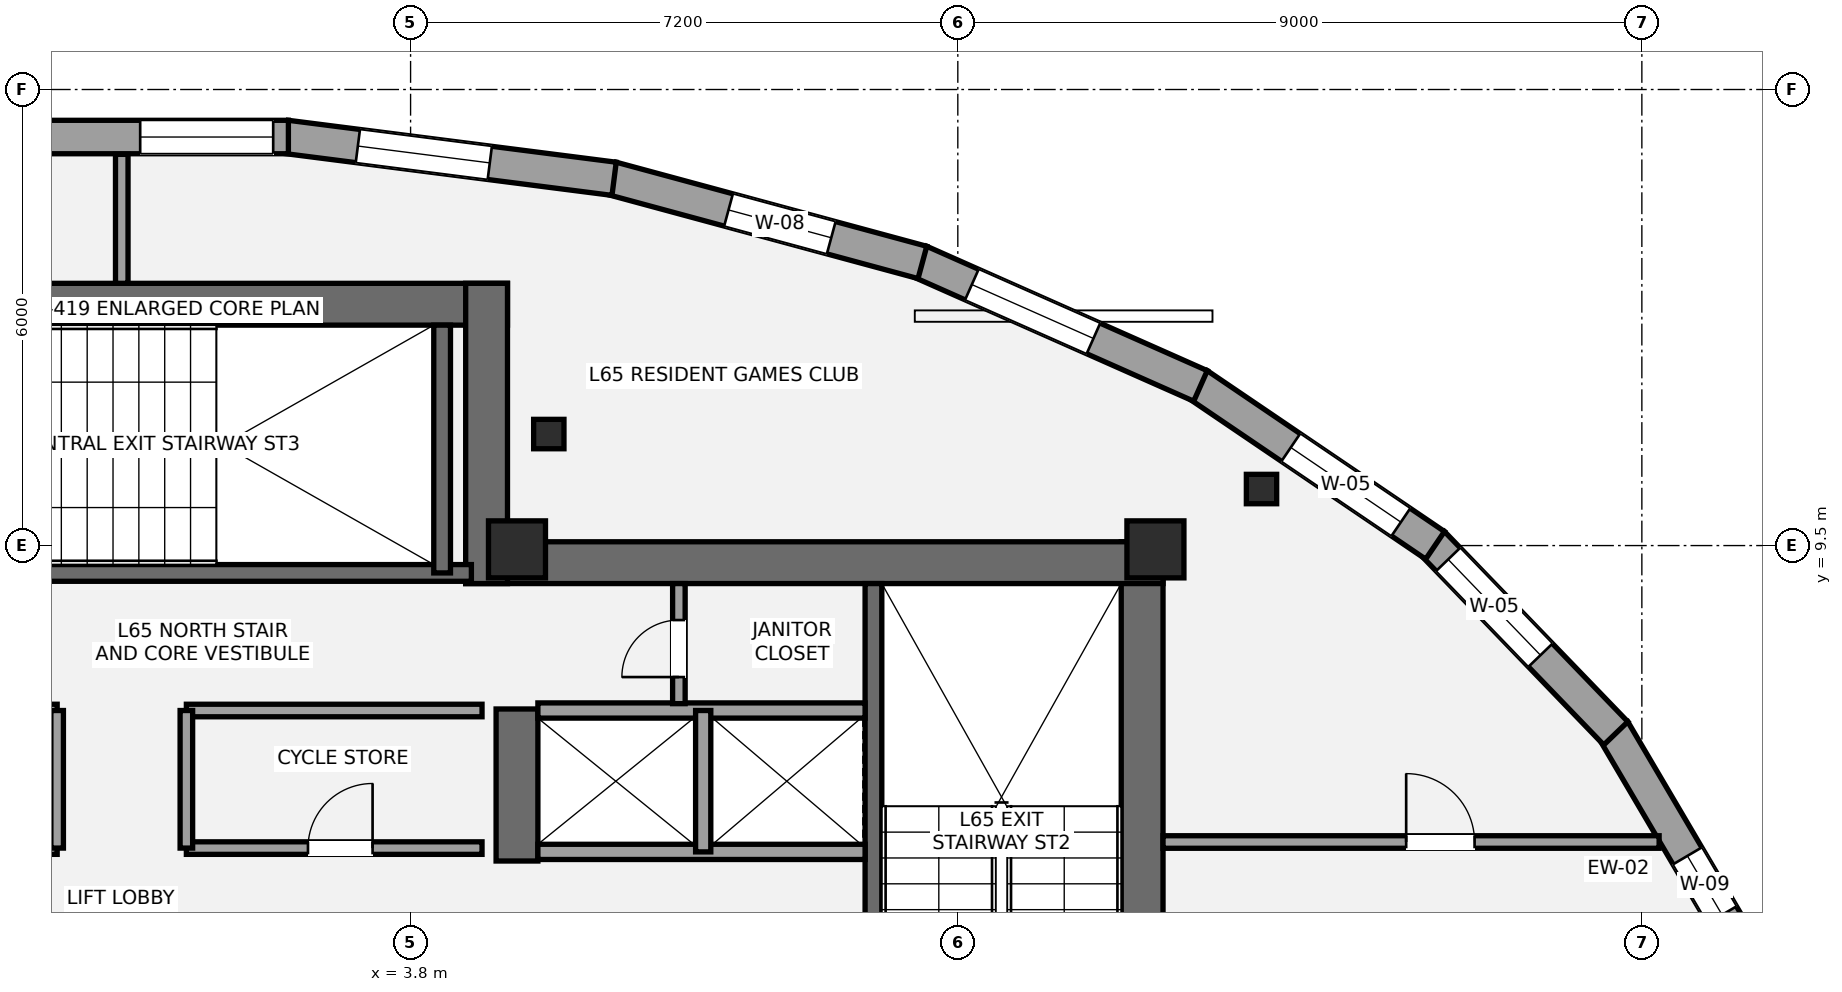
"""IFC4 building model, lengths in metres.
Left out: names, types, materials, properties, quantities, classifications, styles, units other than length and angle.
Written with IfcOpenShell. Run it as: python <this file> out.ifc"""

import sys

from ifc_helpers import new_model, si_unit, direction, frame, frame_2d, origin, origin_2d, place, context, subcontext, project, spatial, rectangle, i_section, extrude, element, fill, save


model = new_model("IFC4")
c1 = context("Model", 3, precision=1e-05, world=origin(), true_north=direction((0.0, 1.0)))
c2 = subcontext(c1, "Body", "Model", "MODEL_VIEW")
j1 = project(units=[si_unit("LENGTHUNIT", "METRE"), si_unit("PLANEANGLEUNIT", "RADIAN")], contexts=[c1])
p1 = place(None, origin())
s1 = spatial("IfcSite", under=j1, at=p1, CompositionType="ELEMENT")
p2 = place(p1, origin())
s2 = spatial("IfcBuilding", under=s1, at=p2, CompositionType="ELEMENT")
p3 = place(p2, frame((0.0, 0.0, 232.05)))
s3 = spatial("IfcBuildingStorey", under=s2, at=p3, CompositionType="ELEMENT", Elevation=232.05)
p4 = place(p3, frame((13.425, 1.3, 0.0), z_axis=(0.0, 0.0, 1.0), x_axis=(0.0, 1.0, 0.0)))
e1 = element("IfcWall", 1, at=p4, inside=s3, PredefinedType="SHEAR", context=c2, shape_type="SweptSolid", body=[
    extrude(rectangle(XDim=8.25, YDim=0.55, at=frame_2d((4.125, 0.0))), origin(), (0.0, 0.0, 1.0), 3.15),
])
p5 = place(p3, frame((4.525, 9.275, 0.0), z_axis=(0.0, 0.0, 1.0), x_axis=(1.0, 0.0, 0.0)))
e2 = element("IfcWall", 2, at=p5, inside=s3, PredefinedType="SHEAR", context=c2, shape_type="SweptSolid", body=[
    extrude(rectangle(XDim=9.175, YDim=0.55, at=frame_2d((4.587, 0.0))), origin(), (0.0, 0.0, 1.0), 3.15),
])
p6 = place(p3, frame((5.2, 5.35, 0.0), z_axis=(0.0, 0.0, 1.0), x_axis=(0.0, 1.0, 0.0)))
e3 = element("IfcWall", 3, at=p6, inside=s3, PredefinedType="SHEAR", context=c2, shape_type="SweptSolid", body=[
    extrude(rectangle(XDim=2.0, YDim=0.55, at=frame_2d((1.0, 0.0))), origin(), (0.0, 0.0, 1.0), 3.15),
])
p7 = place(p3, frame((9.89, 1.85, 0.0), z_axis=(0.0, 0.0, 1.0), x_axis=(0.0, 1.0, 0.0)))
e4 = element("IfcWall", 4, at=p7, inside=s3, PredefinedType="SHEAR", context=c2, shape_type="SweptSolid", body=[
    extrude(rectangle(XDim=7.15, YDim=0.22, at=frame_2d((3.575, 0.0))), origin(), (0.0, 0.0, 1.0), 3.15),
])
p8 = place(p3, frame((-5.075, 12.675, 0.0), z_axis=(0.0, 0.0, 1.0), x_axis=(1.0, 0.0, 0.0)))
e5 = element("IfcWall", 5, at=p8, inside=s3, PredefinedType="SHEAR", context=c2, shape_type="SweptSolid", body=[
    extrude(rectangle(XDim=10.15, YDim=0.55, at=frame_2d((5.075, 0.0))), origin(), (0.0, 0.0, 1.0), 3.15),
])
p9 = place(p3, frame((4.8, 9.0, 0.0), z_axis=(0.0, 0.0, 1.0), x_axis=(0.0, 1.0, 0.0)))
e6 = element("IfcWall", 6, at=p9, inside=s3, PredefinedType="SHEAR", context=c2, shape_type="SweptSolid", body=[
    extrude(rectangle(XDim=3.95, YDim=0.55, at=frame_2d((1.975, 0.0))), origin(), (0.0, 0.0, 1.0), 3.15),
])
p10 = place(p3, frame((-4.7, 9.14, 0.0), z_axis=(0.0, 0.0, 1.0), x_axis=(1.0, 0.0, 0.0)))
e7 = element("IfcWall", 7, at=p10, inside=s3, PredefinedType="SHEAR", context=c2, shape_type="SweptSolid", body=[
    extrude(rectangle(XDim=9.3, YDim=0.22, at=frame_2d((4.65, 0.0))), origin(), (0.0, 0.0, 1.0), 3.15),
])
p11 = place(p10, frame((1.15, 0.0, 0.0)))
e8 = element("IfcOpeningElement", 8, at=p11, cuts=e7, PredefinedType="OPENING", context=c2, shape_type="SweptSolid", body=[
    extrude(rectangle(XDim=1.05, YDim=2.15, at=frame_2d((0.525, 1.075))), frame((0.0, 0.12, 0.0), z_axis=(0.0, -1.0, 0.0), x_axis=(1.0, 0.0, 0.0)), (0.0, 0.0, 1.0), 0.24),
])
p12 = place(p3, frame((4.215, 9.14, 0.0), z_axis=(0.0, 0.0, 1.0), x_axis=(0.0, 1.0, 0.0)))
e9 = element("IfcWall", 9, at=p12, inside=s3, PredefinedType="SHEAR", context=c2, shape_type="SweptSolid", body=[
    extrude(rectangle(XDim=3.26, YDim=0.22, at=frame_2d((1.63, 0.0))), origin(), (0.0, 0.0, 1.0), 3.15),
])
for number, where, z_axis, x_axis in (
    (10, (5.2, 9.45, 0.0), (0.0, 0.0, 1.0), (1.0, 0.0, 0.0)),
    (11, (13.6, 9.45, 0.0), (0.0, 0.0, 1.0), (1.0, 0.0, 0.0)),
):
    element("IfcColumn", number, at=place(p3, frame(where, z_axis=z_axis, x_axis=x_axis)), inside=s3, PredefinedType="PILASTER", context=c2, shape_type="SweptSolid", body=[
        extrude(rectangle(XDim=0.75, YDim=0.75, at=origin_2d()), origin(), (0.0, 0.0, 1.0), 3.15),
    ])
for number, where, z_axis, x_axis in (
    (12, (14.996, 10.244, 0.0), (0.0, 0.0, 1.0), (1.0, 0.0, 0.0)),
    (13, (5.619, 10.967, 0.0), (0.0, 0.0, 1.0), (1.0, 0.0, 0.0)),
):
    element("IfcColumn", number, at=place(p3, frame(where, z_axis=z_axis, x_axis=x_axis)), inside=s3, PredefinedType="COLUMN", context=c2, shape_type="SweptSolid", body=[
        extrude(i_section(OverallWidth=0.399, OverallDepth=0.387, WebThickness=0.021, FlangeThickness=0.033, at=origin_2d()), origin(), (0.0, 0.0, 1.0), 3.15),
    ])
p13 = place(p3, frame((19.626, 7.071, 0.0), z_axis=(0.0, 0.0, 1.0), x_axis=(0.507308799926, -0.861764342218, 0.0)))
e14 = element("IfcWall", 14, at=p13, inside=s3, PredefinedType="STANDARD", context=c2, shape_type="SweptSolid", body=[
    extrude(rectangle(XDim=3.215, YDim=0.44, at=frame_2d((1.607, 0.0))), origin(), (0.0, 0.0, 1.0), 2.336),
])
p14 = place(p13, frame((1.919, 0.0, 0.58)))
e15 = element("IfcOpeningElement", 15, at=p14, cuts=e14, PredefinedType="OPENING", context=c2, shape_type="SweptSolid", body=[
    extrude(rectangle(XDim=0.9, YDim=1.35, at=frame_2d((0.45, 0.675))), frame((0.0, 0.23, 0.0), z_axis=(0.0, -1.0, 0.0), x_axis=(1.0, 0.0, 0.0)), (0.0, 0.0, 1.0), 0.46),
])
p15 = place(p3, frame((17.244, 9.532, 0.0), z_axis=(0.0, 0.0, 1.0), x_axis=(0.694030285144, -0.71994580581, 0.0)))
e16 = element("IfcWall", 16, at=p15, inside=s3, PredefinedType="STANDARD", context=c2, shape_type="SweptSolid", body=[
    extrude(rectangle(XDim=3.476, YDim=0.44, at=frame_2d((1.738, 0.0))), origin(), (0.0, 0.0, 1.0), 2.336),
])
p16 = place(p15, frame((0.298, 0.0, 0.55)))
e17 = element("IfcOpeningElement", 17, at=p16, cuts=e16, PredefinedType="OPENING", context=c2, shape_type="SweptSolid", body=[
    extrude(rectangle(XDim=1.75, YDim=1.55, at=frame_2d((0.875, 0.775))), frame((0.0, 0.23, 0.0), z_axis=(0.0, -1.0, 0.0), x_axis=(1.0, 0.0, 0.0)), (0.0, 0.0, 1.0), 0.46),
])
p17 = place(p3, frame((14.159, 11.619, 0.0), z_axis=(0.0, 0.0, 1.0), x_axis=(0.827641205742, -0.56125754744, 0.0)))
e18 = element("IfcWall", 18, at=p17, inside=s3, PredefinedType="STANDARD", context=c2, shape_type="SweptSolid", body=[
    extrude(rectangle(XDim=3.771, YDim=0.44, at=frame_2d((1.885, 0.0))), origin(), (0.0, 0.0, 1.0), 2.336),
])
p18 = place(p17, frame((1.477, 0.0, 0.55)))
e19 = element("IfcOpeningElement", 19, at=p18, cuts=e18, PredefinedType="OPENING", context=c2, shape_type="SweptSolid", body=[
    extrude(rectangle(XDim=1.75, YDim=1.55, at=frame_2d((0.875, 0.775))), frame((0.0, 0.23, 0.0), z_axis=(0.0, -1.0, 0.0), x_axis=(1.0, 0.0, 0.0)), (0.0, 0.0, 1.0), 0.46),
])
p19 = place(p3, frame((10.502, 13.236, 0.0), z_axis=(0.0, 0.0, 1.0), x_axis=(0.914197700285, -0.405268509501, 0.0)))
e20 = element("IfcWall", 20, at=p19, inside=s3, PredefinedType="STANDARD", context=c2, shape_type="SweptSolid", body=[
    extrude(rectangle(XDim=4.037, YDim=0.44, at=frame_2d((2.019, 0.0))), origin(), (0.0, 0.0, 1.0), 2.336),
])
p20 = place(p19, frame((0.746, 0.0, 0.55)))
e21 = element("IfcOpeningElement", 21, at=p20, cuts=e20, PredefinedType="OPENING", context=c2, shape_type="SweptSolid", body=[
    extrude(rectangle(XDim=1.75, YDim=1.55, at=frame_2d((0.875, 0.775))), frame((0.0, 0.23, 0.0), z_axis=(0.0, -1.0, 0.0), x_axis=(1.0, 0.0, 0.0)), (0.0, 0.0, 1.0), 0.46),
])
p21 = place(p3, frame((6.448, 14.331, 0.0), z_axis=(0.0, 0.0, 1.0), x_axis=(0.965250622562, -0.261325918429, 0.0)))
e22 = element("IfcWall", 22, at=p21, inside=s3, PredefinedType="STANDARD", context=c2, shape_type="SweptSolid", body=[
    extrude(rectangle(XDim=4.233, YDim=0.44, at=frame_2d((2.117, 0.0))), origin(), (0.0, 0.0, 1.0), 2.336),
])
p22 = place(p21, frame((1.59, 0.0, 0.55)))
e23 = element("IfcOpeningElement", 23, at=p22, cuts=e22, PredefinedType="OPENING", context=c2, shape_type="SweptSolid", body=[
    extrude(rectangle(XDim=1.4, YDim=1.55, at=frame_2d((0.7, 0.775))), frame((0.0, 0.23, 0.0), z_axis=(0.0, -1.0, 0.0), x_axis=(1.0, 0.0, 0.0)), (0.0, 0.0, 1.0), 0.46),
])
p23 = place(p3, frame((2.164, 14.877, 0.0), z_axis=(0.0, 0.0, 1.0), x_axis=(0.991932064275, -0.126770579643, 0.0)))
e24 = element("IfcWall", 24, at=p23, inside=s3, PredefinedType="STANDARD", context=c2, shape_type="SweptSolid", body=[
    extrude(rectangle(XDim=4.349, YDim=0.44, at=frame_2d((2.174, 0.0))), origin(), (0.0, 0.0, 1.0), 2.336),
])
p24 = place(p23, frame((0.949, 0.0, 0.55)))
e25 = element("IfcOpeningElement", 25, at=p24, cuts=e24, PredefinedType="OPENING", context=c2, shape_type="SweptSolid", body=[
    extrude(rectangle(XDim=1.75, YDim=1.55, at=frame_2d((0.875, 0.775))), frame((0.0, 0.23, 0.0), z_axis=(0.0, -1.0, 0.0), x_axis=(1.0, 0.0, 0.0)), (0.0, 0.0, 1.0), 0.46),
])
p25 = place(p3, frame((-2.192, 14.875, 0.0), z_axis=(0.0, 0.0, 1.0), x_axis=(1.0, 0.0, 0.0)))
e26 = element("IfcWall", 26, at=p25, inside=s3, PredefinedType="STANDARD", context=c2, shape_type="SweptSolid", body=[
    extrude(rectangle(XDim=4.385, YDim=0.44, at=frame_2d((2.192, 0.0))), origin(), (0.0, 0.0, 1.0), 2.336),
])
p26 = place(p25, frame((2.435, 0.0, 0.55)))
e27 = element("IfcOpeningElement", 27, at=p26, cuts=e26, PredefinedType="OPENING", context=c2, shape_type="SweptSolid", body=[
    extrude(rectangle(XDim=1.75, YDim=1.55, at=frame_2d((0.875, 0.775))), frame((0.0, 0.23, 0.0), z_axis=(0.0, -1.0, 0.0), x_axis=(1.0, 0.0, 0.0)), (0.0, 0.0, 1.0), 0.46),
])
for number, where, z_axis, x_axis in (
    (28, (5.475, 5.47, 0.0), (0.0, 0.0, 1.0), (1.0, 0.0, 0.0)),
    (29, (5.475, 7.33, 0.0), (0.0, 0.0, 1.0), (1.0, 0.0, 0.0)),
):
    element("IfcWall", number, at=place(p3, frame(where, z_axis=z_axis, x_axis=x_axis)), inside=s3, PredefinedType="SOLIDWALL", context=c2, shape_type="SweptSolid", body=[
        extrude(rectangle(XDim=4.305, YDim=0.2, at=frame_2d((2.152, 0.0))), origin(), (0.0, 0.0, 1.0), 2.97),
    ])
p27 = place(p3, frame((7.65, 5.47, 0.0), z_axis=(0.0, 0.0, 1.0), x_axis=(0.0, 1.0, 0.0)))
e30 = element("IfcWall", 30, at=p27, inside=s3, PredefinedType="SOLIDWALL", context=c2, shape_type="SweptSolid", body=[
    extrude(rectangle(XDim=1.86, YDim=0.2, at=frame_2d((0.93, 0.0))), origin(), (0.0, 0.0, 1.0), 2.97),
])
p28 = place(p3, frame((-4.74, 5.52, 0.0), z_axis=(0.0, 0.0, 1.0), x_axis=(1.0, 0.0, 0.0)))
e31 = element("IfcWall", 31, at=p28, inside=s3, PredefinedType="PARTITIONING", context=c2, shape_type="SweptSolid", body=[
    extrude(rectangle(XDim=3.89, YDim=0.165, at=frame_2d((1.945, 0.0))), origin(), (0.0, 0.0, 1.0), 2.97),
])
p29 = place(p28, frame((1.6, 0.0, 0.0)))
e32 = element("IfcOpeningElement", 32, at=p29, cuts=e31, PredefinedType="OPENING", context=c2, shape_type="SweptSolid", body=[
    extrude(rectangle(XDim=0.85, YDim=2.1, at=frame_2d((0.425, 1.05))), frame((0.0, 0.093, 0.0), z_axis=(0.0, -1.0, 0.0), x_axis=(1.0, 0.0, 0.0)), (0.0, 0.0, 1.0), 0.185),
])
p30 = place(p3, frame((-4.74, 7.33, 0.0), z_axis=(0.0, 0.0, 1.0), x_axis=(1.0, 0.0, 0.0)))
e33 = element("IfcWall", 33, at=p30, inside=s3, PredefinedType="PARTITIONING", context=c2, shape_type="SweptSolid", body=[
    extrude(rectangle(XDim=3.89, YDim=0.165, at=frame_2d((1.945, 0.0))), origin(), (0.0, 0.0, 1.0), 2.97),
])
p31 = place(p3, frame((-0.85, 5.52, 0.0), z_axis=(0.0, 0.0, 1.0), x_axis=(0.0, 1.0, 0.0)))
e34 = element("IfcWall", 34, at=p31, inside=s3, PredefinedType="PARTITIONING", context=c2, shape_type="SweptSolid", body=[
    extrude(rectangle(XDim=1.81, YDim=0.165, at=frame_2d((0.905, 0.0))), origin(), (0.0, 0.0, 1.0), 2.97),
])
p32 = place(p3, frame((0.85, 5.52, 0.0), z_axis=(0.0, 0.0, 1.0), x_axis=(1.0, 0.0, 0.0)))
e35 = element("IfcWall", 35, at=p32, inside=s3, PredefinedType="PARTITIONING", context=c2, shape_type="SweptSolid", body=[
    extrude(rectangle(XDim=3.89, YDim=0.165, at=frame_2d((1.945, 0.0))), origin(), (0.0, 0.0, 1.0), 2.97),
])
p33 = place(p32, frame((1.6, 0.0, 0.0)))
e36 = element("IfcOpeningElement", 36, at=p33, cuts=e35, PredefinedType="OPENING", context=c2, shape_type="SweptSolid", body=[
    extrude(rectangle(XDim=0.85, YDim=2.1, at=frame_2d((0.425, 1.05))), frame((0.0, 0.093, 0.0), z_axis=(0.0, -1.0, 0.0), x_axis=(1.0, 0.0, 0.0)), (0.0, 0.0, 1.0), 0.185),
])
p34 = place(p3, frame((0.85, 7.33, 0.0), z_axis=(0.0, 0.0, 1.0), x_axis=(1.0, 0.0, 0.0)))
e37 = element("IfcWall", 37, at=p34, inside=s3, PredefinedType="PARTITIONING", context=c2, shape_type="SweptSolid", body=[
    extrude(rectangle(XDim=3.89, YDim=0.165, at=frame_2d((1.945, 0.0))), origin(), (0.0, 0.0, 1.0), 2.97),
])
p35 = place(p3, frame((0.85, 5.52, 0.0), z_axis=(0.0, 0.0, 1.0), x_axis=(0.0, 1.0, 0.0)))
e38 = element("IfcWall", 38, at=p35, inside=s3, PredefinedType="PARTITIONING", context=c2, shape_type="SweptSolid", body=[
    extrude(rectangle(XDim=1.81, YDim=0.165, at=frame_2d((0.905, 0.0))), origin(), (0.0, 0.0, 1.0), 2.97),
])
p36 = place(p3, frame((7.33, 7.42, 0.0), z_axis=(0.0, 0.0, 1.0), x_axis=(0.0, 1.0, 0.0)))
e39 = element("IfcWall", 39, at=p36, inside=s3, PredefinedType="PARTITIONING", context=c2, shape_type="SweptSolid", body=[
    extrude(rectangle(XDim=1.58, YDim=0.165, at=frame_2d((0.79, 0.0))), origin(), (0.0, 0.0, 1.0), 2.97),
])
p37 = place(p36, frame((0.35, 0.0, 0.0)))
e40 = element("IfcOpeningElement", 40, at=p37, cuts=e39, PredefinedType="OPENING", context=c2, shape_type="SweptSolid", body=[
    extrude(rectangle(XDim=0.75, YDim=2.1, at=frame_2d((0.375, 1.05))), frame((0.0, 0.093, 0.0), z_axis=(0.0, -1.0, 0.0), x_axis=(1.0, 0.0, 0.0)), (0.0, 0.0, 1.0), 0.185),
])
p38 = place(p3, frame((0.0, 12.95, 0.0), z_axis=(0.0, 0.0, 1.0), x_axis=(0.0, 1.0, 0.0)))
e41 = element("IfcWall", 41, at=p38, inside=s3, PredefinedType="PARTITIONING", context=c2, shape_type="SweptSolid", body=[
    extrude(rectangle(XDim=1.697, YDim=0.165, at=frame_2d((0.848, 0.0))), origin(), (0.0, 0.0, 1.0), 2.97),
])
p39 = place(p3, frame((13.7, 5.6, 0.0), z_axis=(0.0, 0.0, 1.0), x_axis=(1.0, 0.0, 0.0)))
e42 = element("IfcWall", 42, at=p39, inside=s3, PredefinedType="PARTITIONING", context=c2, shape_type="SweptSolid", body=[
    extrude(rectangle(XDim=6.527, YDim=0.165, at=frame_2d((3.264, 0.0))), origin(), (0.0, 0.0, 1.0), 2.423),
])
p40 = place(p39, frame((3.199, 0.0, 0.0)))
e43 = element("IfcOpeningElement", 43, at=p40, cuts=e42, PredefinedType="OPENING", context=c2, shape_type="SweptSolid", body=[
    extrude(rectangle(XDim=0.9, YDim=2.1, at=frame_2d((0.45, 1.05))), frame((0.0, 0.093, 0.0), z_axis=(0.0, -1.0, 0.0), x_axis=(1.0, 0.0, 0.0)), (0.0, 0.0, 1.0), 0.185),
])
p41 = place(p14, origin())
e44 = element("IfcWindow", 44, at=p41, inside=s3, PartitioningType="SINGLE_PANEL", PredefinedType="WINDOW", context=c2, shape_type="SweptSolid", body=[
    extrude(rectangle(XDim=0.9, YDim=1.35, at=frame_2d((0.45, 0.675))), frame((0.0, -0.01, 0.0), z_axis=(0.0, -1.0, 0.0), x_axis=(1.0, 0.0, 0.0)), (0.0, 0.0, 1.0), 0.06),
])
fill(e15, e44)
p42 = place(p16, origin())
e45 = element("IfcWindow", 45, at=p42, inside=s3, PartitioningType="SINGLE_PANEL", PredefinedType="WINDOW", context=c2, shape_type="SweptSolid", body=[
    extrude(rectangle(XDim=1.75, YDim=1.55, at=frame_2d((0.875, 0.775))), frame((0.0, -0.01, 0.0), z_axis=(0.0, -1.0, 0.0), x_axis=(1.0, 0.0, 0.0)), (0.0, 0.0, 1.0), 0.06),
])
fill(e17, e45)
p43 = place(p18, origin())
e46 = element("IfcWindow", 46, at=p43, inside=s3, PartitioningType="SINGLE_PANEL", PredefinedType="WINDOW", context=c2, shape_type="SweptSolid", body=[
    extrude(rectangle(XDim=1.75, YDim=1.55, at=frame_2d((0.875, 0.775))), frame((0.0, -0.01, 0.0), z_axis=(0.0, -1.0, 0.0), x_axis=(1.0, 0.0, 0.0)), (0.0, 0.0, 1.0), 0.06),
])
fill(e19, e46)
p44 = place(p20, origin())
e47 = element("IfcWindow", 47, at=p44, inside=s3, PartitioningType="SINGLE_PANEL", PredefinedType="WINDOW", context=c2, shape_type="SweptSolid", body=[
    extrude(rectangle(XDim=1.75, YDim=1.55, at=frame_2d((0.875, 0.775))), frame((0.0, -0.01, 0.0), z_axis=(0.0, -1.0, 0.0), x_axis=(1.0, 0.0, 0.0)), (0.0, 0.0, 1.0), 0.06),
])
fill(e21, e47)
p45 = place(p22, origin())
e48 = element("IfcWindow", 48, at=p45, inside=s3, PartitioningType="SINGLE_PANEL", PredefinedType="WINDOW", context=c2, shape_type="SweptSolid", body=[
    extrude(rectangle(XDim=1.4, YDim=1.55, at=frame_2d((0.7, 0.775))), frame((0.0, -0.01, 0.0), z_axis=(0.0, -1.0, 0.0), x_axis=(1.0, 0.0, 0.0)), (0.0, 0.0, 1.0), 0.06),
])
fill(e23, e48)
p46 = place(p24, origin())
e49 = element("IfcWindow", 49, at=p46, inside=s3, PartitioningType="SINGLE_PANEL", PredefinedType="WINDOW", context=c2, shape_type="SweptSolid", body=[
    extrude(rectangle(XDim=1.75, YDim=1.55, at=frame_2d((0.875, 0.775))), frame((0.0, -0.01, 0.0), z_axis=(0.0, -1.0, 0.0), x_axis=(1.0, 0.0, 0.0)), (0.0, 0.0, 1.0), 0.06),
])
fill(e25, e49)
p47 = place(p26, origin())
e50 = element("IfcWindow", 50, at=p47, inside=s3, PartitioningType="SINGLE_PANEL", PredefinedType="WINDOW", context=c2, shape_type="SweptSolid", body=[
    extrude(rectangle(XDim=1.75, YDim=1.55, at=frame_2d((0.875, 0.775))), frame((0.0, -0.01, 0.0), z_axis=(0.0, -1.0, 0.0), x_axis=(1.0, 0.0, 0.0)), (0.0, 0.0, 1.0), 0.06),
])
fill(e27, e50)
p48 = place(p33, origin())
e51 = element("IfcDoor", 51, at=p48, inside=s3, OperationType="SINGLE_SWING_RIGHT", PredefinedType="DOOR", context=c2, shape_type="SweptSolid", body=[
    extrude(rectangle(XDim=0.85, YDim=2.1, at=frame_2d((0.425, 1.05))), frame((0.0, 0.025, 0.0), z_axis=(0.0, -1.0, 0.0), x_axis=(1.0, 0.0, 0.0)), (0.0, 0.0, 1.0), 0.05),
])
fill(e36, e51)
p49 = place(p37, origin())
e52 = element("IfcDoor", 52, at=p49, inside=s3, OperationType="SINGLE_SWING_LEFT", PredefinedType="DOOR", context=c2, shape_type="SweptSolid", body=[
    extrude(rectangle(XDim=0.75, YDim=2.1, at=frame_2d((0.375, 1.05))), frame((0.0, 0.025, 0.0), z_axis=(0.0, -1.0, 0.0), x_axis=(1.0, 0.0, 0.0)), (0.0, 0.0, 1.0), 0.05),
])
fill(e40, e52)
p50 = place(p40, origin())
e53 = element("IfcDoor", 53, at=p50, inside=s3, OperationType="SINGLE_SWING_LEFT", PredefinedType="DOOR", context=c2, shape_type="SweptSolid", body=[
    extrude(rectangle(XDim=0.9, YDim=2.1, at=frame_2d((0.45, 1.05))), frame((0.0, 0.025, 0.0), z_axis=(0.0, -1.0, 0.0), x_axis=(1.0, 0.0, 0.0)), (0.0, 0.0, 1.0), 0.05),
])
fill(e43, e53)
save(model, sys.argv[1])
